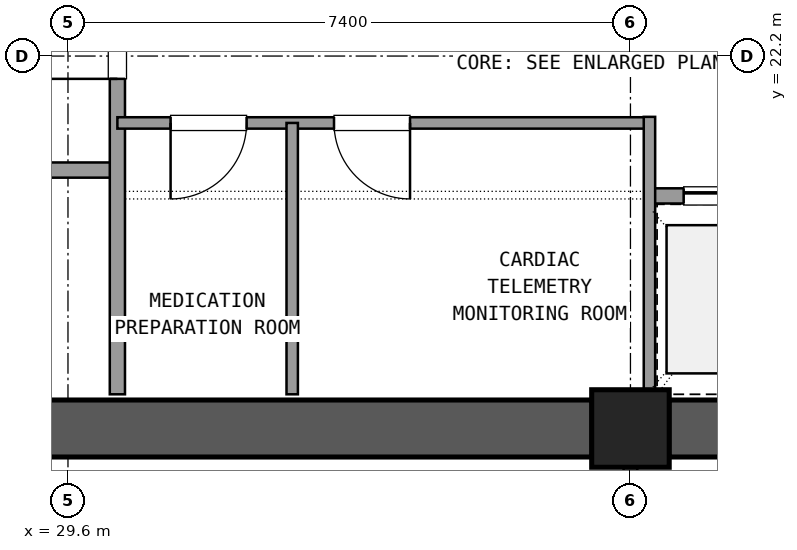
"""IFC4 building model, lengths in metres.
Left out: names, types, materials, properties, quantities, classifications, styles, units other than length and angle.
Written with IfcOpenShell. Run it as: python <this file> out.ifc"""

import sys

from ifc_helpers import new_model, si_unit, direction, frame, frame_2d, origin, origin_2d, place, context, subcontext, project, spatial, rectangle, extrude, element, fill, save


model = new_model("IFC4")
c1 = context("Model", 3, precision=1e-05, world=origin(), true_north=direction((0.0, 1.0)))
c2 = subcontext(c1, "Body", "Model", "MODEL_VIEW")
j1 = project(units=[si_unit("LENGTHUNIT", "METRE"), si_unit("PLANEANGLEUNIT", "RADIAN")], contexts=[c1])
p1 = place(None, origin())
s1 = spatial("IfcSite", under=j1, at=p1, CompositionType="ELEMENT")
p2 = place(p1, origin())
s2 = spatial("IfcBuilding", under=s1, at=p2, CompositionType="ELEMENT")
p3 = place(p2, frame((0.0, 0.0, 113.58)))
s3 = spatial("IfcBuildingStorey", under=s2, at=p3, CompositionType="ELEMENT", Elevation=113.58)
p4 = place(p3, frame((37.0, 17.3, 0.0), z_axis=(0.0, 0.0, 1.0), x_axis=(1.0, 0.0, 0.0)))
e1 = element("IfcColumn", 1, at=p4, inside=s3, PredefinedType="COLUMN", context=c2, shape_type="SweptSolid", body=[
    extrude(rectangle(XDim=1.02, YDim=1.02, at=origin_2d()), origin(), (0.0, 0.0, 1.0), 3.6),
])
for number, where, z_axis, x_axis in (
    (2, (26.305, 17.3, 0.0), (0.0, 0.0, 1.0), (1.0, 0.0, 0.0)),
    (3, (37.505, 17.3, 0.0), (0.0, 0.0, 1.0), (1.0, 0.0, 0.0)),
):
    element("IfcWall", number, at=place(p3, frame(where, z_axis=z_axis, x_axis=x_axis)), inside=s3, PredefinedType="SHEAR", context=c2, shape_type="SweptSolid", body=[
        extrude(rectangle(XDim=10.19, YDim=0.75, at=frame_2d((5.095, 0.0))), origin(), (0.0, 0.0, 1.0), 3.32),
    ])
p5 = place(p3, frame((26.25, 20.7, 0.0), z_axis=(0.0, 0.0, 1.0), x_axis=(1.0, 0.0, 0.0)))
e4 = element("IfcWall", 4, at=p5, inside=s3, PredefinedType="SOLIDWALL", context=c2, shape_type="SweptSolid", body=[
    extrude(rectangle(XDim=4.0, YDim=0.2, at=frame_2d((2.0, 0.0))), origin(), (0.0, 0.0, 1.0), 2.61),
])
p6 = place(p5, frame((0.65, 0.0, 0.0)))
e5 = element("IfcOpeningElement", 5, at=p6, cuts=e4, PredefinedType="OPENING", context=c2, shape_type="SweptSolid", body=[
    extrude(rectangle(XDim=1.2, YDim=2.15, at=frame_2d((0.6, 1.075))), frame((0.0, 0.11, 0.0), z_axis=(0.0, -1.0, 0.0), x_axis=(1.0, 0.0, 0.0)), (0.0, 0.0, 1.0), 0.22),
])
p7 = place(p3, frame((30.25, 17.75, 0.0), z_axis=(0.0, 0.0, 1.0), x_axis=(0.0, 1.0, 0.0)))
e6 = element("IfcWall", 6, at=p7, inside=s3, PredefinedType="SOLIDWALL", context=c2, shape_type="SweptSolid", body=[
    extrude(rectangle(XDim=6.9, YDim=0.2, at=frame_2d((3.45, 0.0))), origin(), (0.0, 0.0, 1.0), 2.61),
])
p8 = place(p7, frame((4.15, 0.0, 0.0)))
e7 = element("IfcOpeningElement", 7, at=p8, cuts=e6, PredefinedType="OPENING", context=c2, shape_type="SweptSolid", body=[
    extrude(rectangle(XDim=1.2, YDim=2.15, at=frame_2d((0.6, 1.075))), frame((0.0, 0.11, 0.0), z_axis=(0.0, -1.0, 0.0), x_axis=(1.0, 0.0, 0.0)), (0.0, 0.0, 1.0), 0.22),
])
p9 = place(p3, frame((30.25, 21.32, 0.0), z_axis=(0.0, 0.0, 1.0), x_axis=(1.0, 0.0, 0.0)))
e8 = element("IfcWall", 8, at=p9, inside=s3, PredefinedType="PARTITIONING", context=c2, shape_type="SweptSolid", body=[
    extrude(rectangle(XDim=7.0, YDim=0.15, at=frame_2d((3.5, 0.0))), origin(), (0.0, 0.0, 1.0), 2.61),
])
p10 = place(p9, frame((0.7, 0.0, 0.0)))
e9 = element("IfcOpeningElement", 9, at=p10, cuts=e8, PredefinedType="OPENING", context=c2, shape_type="SweptSolid", body=[
    extrude(rectangle(XDim=1.0, YDim=2.15, at=frame_2d((0.5, 1.075))), frame((0.0, 0.085, 0.0), z_axis=(0.0, -1.0, 0.0), x_axis=(1.0, 0.0, 0.0)), (0.0, 0.0, 1.0), 0.17),
])
p11 = place(p9, frame((2.85, 0.0, 0.0)))
e10 = element("IfcOpeningElement", 10, at=p11, cuts=e8, PredefinedType="OPENING", context=c2, shape_type="SweptSolid", body=[
    extrude(rectangle(XDim=1.0, YDim=2.15, at=frame_2d((0.5, 1.075))), frame((0.0, 0.085, 0.0), z_axis=(0.0, -1.0, 0.0), x_axis=(1.0, 0.0, 0.0)), (0.0, 0.0, 1.0), 0.17),
])
p12 = place(p3, frame((32.55, 17.75, 0.0), z_axis=(0.0, 0.0, 1.0), x_axis=(0.0, 1.0, 0.0)))
e11 = element("IfcWall", 11, at=p12, inside=s3, PredefinedType="PARTITIONING", context=c2, shape_type="SweptSolid", body=[
    extrude(rectangle(XDim=3.57, YDim=0.15, at=frame_2d((1.785, 0.0))), origin(), (0.0, 0.0, 1.0), 2.61),
])
p13 = place(p3, frame((37.25, 20.36, 0.0), z_axis=(0.0, 0.0, 1.0), x_axis=(1.0, 0.0, 0.0)))
e12 = element("IfcWall", 12, at=p13, inside=s3, PredefinedType="SOLIDWALL", context=c2, shape_type="SweptSolid", body=[
    extrude(rectangle(XDim=6.1, YDim=0.2, at=frame_2d((3.05, 0.0))), origin(), (0.0, 0.0, 1.0), 2.61),
])
p14 = place(p13, frame((0.45, 0.0, 0.0)))
e13 = element("IfcOpeningElement", 13, at=p14, cuts=e12, PredefinedType="OPENING", context=c2, shape_type="SweptSolid", body=[
    extrude(rectangle(XDim=1.1, YDim=2.15, at=frame_2d((0.55, 1.075))), frame((0.0, 0.11, 0.0), z_axis=(0.0, -1.0, 0.0), x_axis=(1.0, 0.0, 0.0)), (0.0, 0.0, 1.0), 0.22),
])
p15 = place(p13, frame((2.5, 0.0, 0.0)))
e14 = element("IfcOpeningElement", 14, at=p15, cuts=e12, PredefinedType="OPENING", context=c2, shape_type="SweptSolid", body=[
    extrude(rectangle(XDim=1.1, YDim=2.15, at=frame_2d((0.55, 1.075))), frame((0.0, 0.11, 0.0), z_axis=(0.0, -1.0, 0.0), x_axis=(1.0, 0.0, 0.0)), (0.0, 0.0, 1.0), 0.22),
])
p16 = place(p13, frame((4.55, 0.0, 0.0)))
e15 = element("IfcOpeningElement", 15, at=p16, cuts=e12, PredefinedType="OPENING", context=c2, shape_type="SweptSolid", body=[
    extrude(rectangle(XDim=1.1, YDim=2.15, at=frame_2d((0.55, 1.075))), frame((0.0, 0.11, 0.0), z_axis=(0.0, -1.0, 0.0), x_axis=(1.0, 0.0, 0.0)), (0.0, 0.0, 1.0), 0.22),
])
p17 = place(p3, frame((37.25, 17.75, 0.0), z_axis=(0.0, 0.0, 1.0), x_axis=(0.0, 1.0, 0.0)))
e16 = element("IfcWall", 16, at=p17, inside=s3, PredefinedType="PARTITIONING", context=c2, shape_type="SweptSolid", body=[
    extrude(rectangle(XDim=3.65, YDim=0.15, at=frame_2d((1.825, 0.0))), origin(), (0.0, 0.0, 1.0), 2.61),
])
p18 = place(p3, frame((37.0, 13.64, 0.0), z_axis=(0.0, 0.0, 1.0), x_axis=(0.0, 1.0, 0.0)))
e17 = element("IfcWall", 17, at=p18, inside=s3, PredefinedType="PARTITIONING", context=c2, shape_type="SweptSolid", body=[
    extrude(rectangle(XDim=3.21, YDim=0.18, at=frame_2d((1.605, 0.0))), origin(), (0.0, 0.0, 1.0), 2.61),
])
p19 = place(p18, frame((0.605, 0.0, 0.0)))
e18 = element("IfcOpeningElement", 18, at=p19, cuts=e17, PredefinedType="OPENING", context=c2, shape_type="SweptSolid", body=[
    extrude(rectangle(XDim=2.0, YDim=2.2, at=frame_2d((1.0, 1.1))), frame((0.0, 0.1, 0.0), z_axis=(0.0, -1.0, 0.0), x_axis=(1.0, 0.0, 0.0)), (0.0, 0.0, 1.0), 0.2),
])
p20 = place(p8, origin())
e19 = element("IfcDoor", 19, at=p20, inside=s3, OperationType="SINGLE_SWING_LEFT", PredefinedType="DOOR", context=c2, shape_type="SweptSolid", body=[
    extrude(rectangle(XDim=1.2, YDim=2.15, at=frame_2d((0.6, 1.075))), frame((0.0, 0.025, 0.0), z_axis=(0.0, -1.0, 0.0), x_axis=(1.0, 0.0, 0.0)), (0.0, 0.0, 1.0), 0.05),
])
fill(e7, e19)
p21 = place(p10, frame((1.0, 0.0, 0.0), z_axis=(0.0, 0.0, 1.0), x_axis=(-1.0, 0.0, 0.0)))
e20 = element("IfcDoor", 20, at=p21, inside=s3, OperationType="SINGLE_SWING_LEFT", PredefinedType="DOOR", context=c2, shape_type="SweptSolid", body=[
    extrude(rectangle(XDim=1.0, YDim=2.15, at=frame_2d((0.5, 1.075))), frame((0.0, 0.025, 0.0), z_axis=(0.0, -1.0, 0.0), x_axis=(1.0, 0.0, 0.0)), (0.0, 0.0, 1.0), 0.05),
])
fill(e9, e20)
p22 = place(p11, frame((1.0, 0.0, 0.0), z_axis=(0.0, 0.0, 1.0), x_axis=(-1.0, 0.0, 0.0)))
e21 = element("IfcDoor", 21, at=p22, inside=s3, OperationType="SINGLE_SWING_RIGHT", PredefinedType="DOOR", context=c2, shape_type="SweptSolid", body=[
    extrude(rectangle(XDim=1.0, YDim=2.15, at=frame_2d((0.5, 1.075))), frame((0.0, 0.025, 0.0), z_axis=(0.0, -1.0, 0.0), x_axis=(1.0, 0.0, 0.0)), (0.0, 0.0, 1.0), 0.05),
])
fill(e10, e21)
p23 = place(p14, origin())
e22 = element("IfcDoor", 22, at=p23, inside=s3, OperationType="SLIDING_TO_LEFT", PredefinedType="DOOR", context=c2, shape_type="SweptSolid", body=[
    extrude(rectangle(XDim=1.1, YDim=2.15, at=frame_2d((0.55, 1.075))), frame((0.0, 0.025, 0.0), z_axis=(0.0, -1.0, 0.0), x_axis=(1.0, 0.0, 0.0)), (0.0, 0.0, 1.0), 0.05),
])
fill(e13, e22)
save(model, sys.argv[1])
